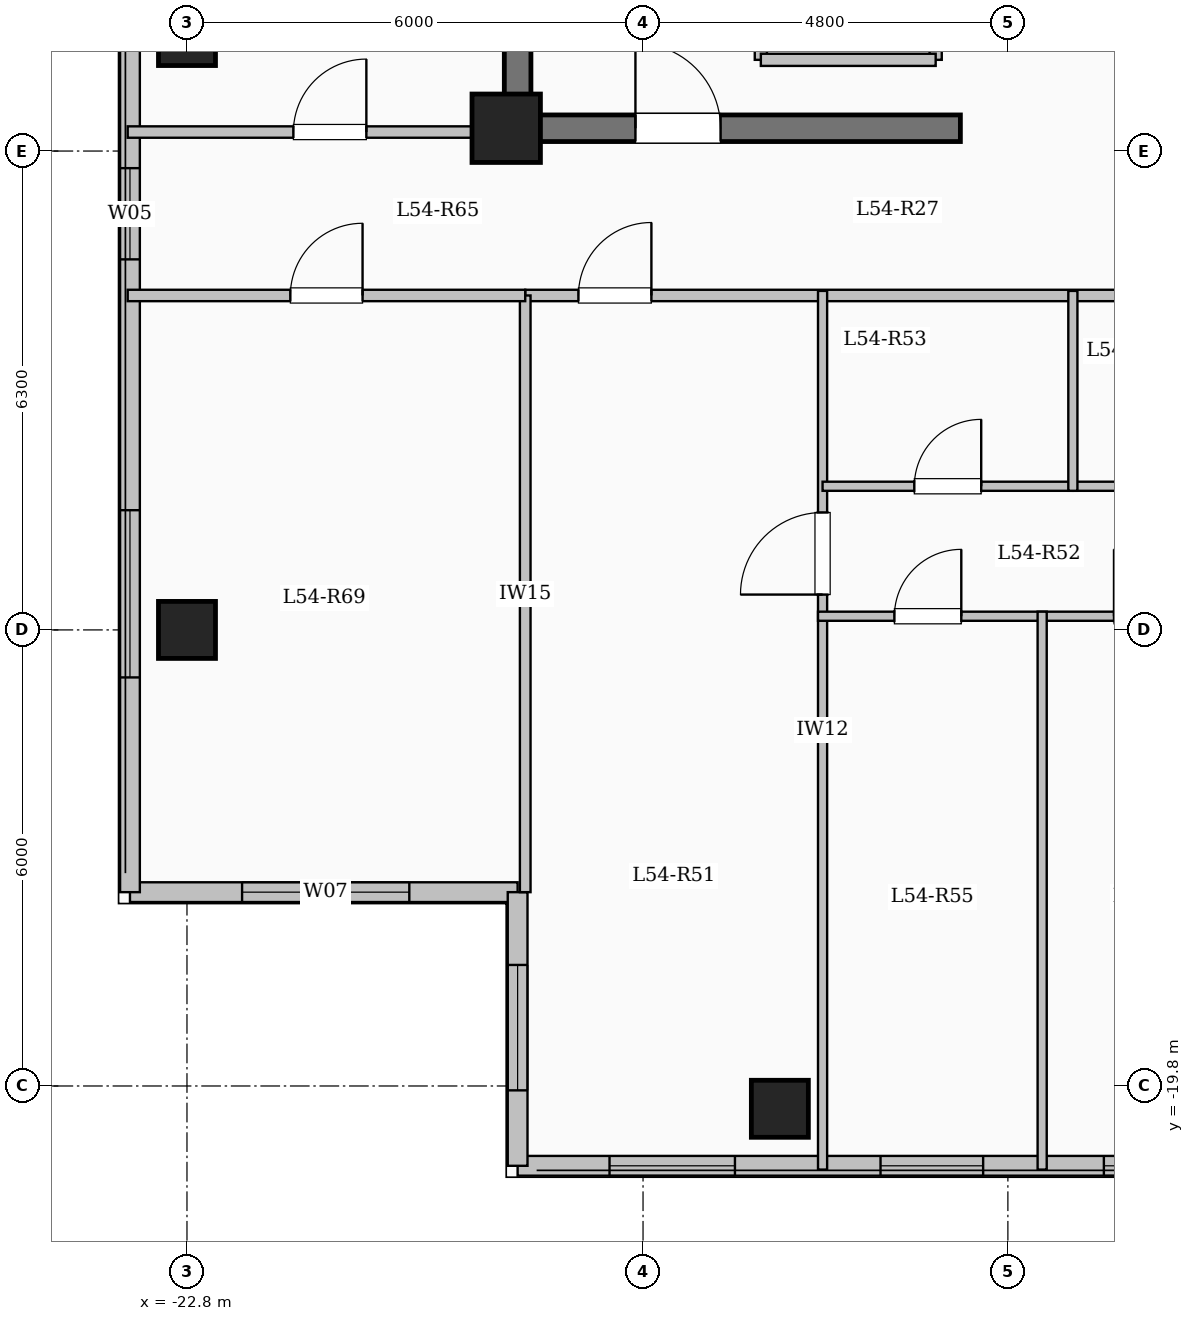
"""IFC4 building model, lengths in metres.
Left out: names, types, materials, properties, quantities, classifications, styles, units other than length and angle.
Written with IfcOpenShell. Run it as: python <this file> out.ifc"""

import sys

from ifc_helpers import new_model, si_unit, direction, frame, frame_2d, origin, origin_2d, place, context, subcontext, project, spatial, rectangle, extrude, element, fill, save


model = new_model("IFC4")
c1 = context("Model", 3, precision=1e-05, world=origin(), true_north=direction((0.0, 1.0)))
c2 = subcontext(c1, "Body", "Model", "MODEL_VIEW")
j1 = project(units=[si_unit("LENGTHUNIT", "METRE"), si_unit("PLANEANGLEUNIT", "RADIAN")], contexts=[c1])
p1 = place(None, origin())
s1 = spatial("IfcSite", under=j1, at=p1, CompositionType="ELEMENT")
p2 = place(p1, origin())
s2 = spatial("IfcBuilding", under=s1, at=p2, CompositionType="ELEMENT")
p3 = place(p2, frame((0.0, 0.0, 200.3)))
s3 = spatial("IfcBuildingStorey", under=s2, at=p3, CompositionType="ELEMENT", Elevation=200.3)
p4 = place(p3, frame((-18.6, -7.2, 0.0), z_axis=(0.0, 0.0, 1.0), x_axis=(1.0, 0.0, 0.0)))
e1 = element("IfcColumn", 1, at=p4, inside=s3, PredefinedType="COLUMN", context=c2, shape_type="SweptSolid", body=[
    extrude(rectangle(XDim=0.9, YDim=0.9, at=origin_2d()), origin(), (0.0, 0.0, 1.0), 3.35),
])
for number, where, z_axis, x_axis in (
    (2, (-15.0, -20.1, 0.0), (0.0, 0.0, 1.0), (1.0, 0.0, 0.0)),
    (3, (-22.8, -13.8, 0.0), (0.0, 0.0, 1.0), (1.0, 0.0, 0.0)),
    (4, (-22.8, -6.0, 0.0), (0.0, 0.0, 1.0), (1.0, 0.0, 0.0)),
):
    element("IfcColumn", number, at=place(p3, frame(where, z_axis=z_axis, x_axis=x_axis)), inside=s3, PredefinedType="COLUMN", context=c2, shape_type="SweptSolid", body=[
        extrude(rectangle(XDim=0.75, YDim=0.75, at=origin_2d()), origin(), (0.0, 0.0, 1.0), 3.35),
    ])
p5 = place(p3, frame((-18.45, -17.25, 0.0), z_axis=(0.0, 0.0, 1.0), x_axis=(-1.0, 0.0, 0.0)))
e5 = element("IfcWall", 5, at=p5, inside=s3, PredefinedType="SOLIDWALL", context=c2, shape_type="SweptSolid", body=[
    extrude(rectangle(XDim=5.1, YDim=0.26, at=frame_2d((2.55, 0.0))), origin(), (0.0, 0.0, 1.0), 3.1),
])
p6 = place(p5, frame((1.425, 0.0, 0.9)))
e6 = element("IfcOpeningElement", 6, at=p6, cuts=e5, PredefinedType="OPENING", context=c2, shape_type="SweptSolid", body=[
    extrude(rectangle(XDim=2.2, YDim=1.75, at=frame_2d((1.1, 0.875))), frame((0.0, 0.14, 0.0), z_axis=(0.0, -1.0, 0.0), x_axis=(1.0, 0.0, 0.0)), (0.0, 0.0, 1.0), 0.28),
])
p7 = place(p3, frame((-23.55, -17.25, 0.0), z_axis=(0.0, 0.0, 1.0), x_axis=(0.0, 1.0, 0.0)))
e7 = element("IfcWall", 7, at=p7, inside=s3, PredefinedType="SOLIDWALL", context=c2, shape_type="SweptSolid", body=[
    extrude(rectangle(XDim=34.5, YDim=0.26, at=frame_2d((17.25, 0.0))), origin(), (0.0, 0.0, 1.0), 3.1),
])
p8 = place(p7, frame((2.825, 0.0, 0.9)))
e8 = element("IfcOpeningElement", 8, at=p8, cuts=e7, PredefinedType="OPENING", context=c2, shape_type="SweptSolid", body=[
    extrude(rectangle(XDim=2.2, YDim=1.75, at=frame_2d((1.1, 0.875))), frame((0.0, 0.14, 0.0), z_axis=(0.0, -1.0, 0.0), x_axis=(1.0, 0.0, 0.0)), (0.0, 0.0, 1.0), 0.28),
])
p9 = place(p7, frame((8.325, 0.0, 0.95)))
e9 = element("IfcOpeningElement", 9, at=p9, cuts=e7, PredefinedType="OPENING", context=c2, shape_type="SweptSolid", body=[
    extrude(rectangle(XDim=1.2, YDim=1.5, at=frame_2d((0.6, 0.75))), frame((0.0, 0.14, 0.0), z_axis=(0.0, -1.0, 0.0), x_axis=(1.0, 0.0, 0.0)), (0.0, 0.0, 1.0), 0.28),
])
p10 = place(p7, frame((13.25, 0.0, 0.9)))
e10 = element("IfcOpeningElement", 10, at=p10, cuts=e7, PredefinedType="OPENING", context=c2, shape_type="SweptSolid", body=[
    extrude(rectangle(XDim=2.2, YDim=1.75, at=frame_2d((1.1, 0.875))), frame((0.0, 0.14, 0.0), z_axis=(0.0, -1.0, 0.0), x_axis=(1.0, 0.0, 0.0)), (0.0, 0.0, 1.0), 0.28),
])
p11 = place(p7, frame((19.65, 0.0, 0.9)))
e11 = element("IfcOpeningElement", 11, at=p11, cuts=e7, PredefinedType="OPENING", context=c2, shape_type="SweptSolid", body=[
    extrude(rectangle(XDim=1.65, YDim=1.6, at=frame_2d((0.825, 0.8))), frame((0.0, 0.14, 0.0), z_axis=(0.0, -1.0, 0.0), x_axis=(1.0, 0.0, 0.0)), (0.0, 0.0, 1.0), 0.28),
])
p12 = place(p7, frame((24.125, 0.0, 0.9)))
e12 = element("IfcOpeningElement", 12, at=p12, cuts=e7, PredefinedType="OPENING", context=c2, shape_type="SweptSolid", body=[
    extrude(rectangle(XDim=2.0, YDim=1.7, at=frame_2d((1.0, 0.85))), frame((0.0, 0.14, 0.0), z_axis=(0.0, -1.0, 0.0), x_axis=(1.0, 0.0, 0.0)), (0.0, 0.0, 1.0), 0.28),
])
p13 = place(p7, frame((28.375, 0.0, 0.95)))
e13 = element("IfcOpeningElement", 13, at=p13, cuts=e7, PredefinedType="OPENING", context=c2, shape_type="SweptSolid", body=[
    extrude(rectangle(XDim=1.0, YDim=1.5, at=frame_2d((0.5, 0.75))), frame((0.0, 0.14, 0.0), z_axis=(0.0, -1.0, 0.0), x_axis=(1.0, 0.0, 0.0)), (0.0, 0.0, 1.0), 0.28),
])
p14 = place(p7, frame((31.125, 0.0, 0.9)))
e14 = element("IfcOpeningElement", 14, at=p14, cuts=e7, PredefinedType="OPENING", context=c2, shape_type="SweptSolid", body=[
    extrude(rectangle(XDim=2.0, YDim=1.7, at=frame_2d((1.0, 0.85))), frame((0.0, 0.14, 0.0), z_axis=(0.0, -1.0, 0.0), x_axis=(1.0, 0.0, 0.0)), (0.0, 0.0, 1.0), 0.28),
])
p15 = place(p3, frame((-7.35, -20.85, 0.0), z_axis=(0.0, 0.0, 1.0), x_axis=(-1.0, 0.0, 0.0)))
e15 = element("IfcWall", 15, at=p15, inside=s3, PredefinedType="SOLIDWALL", context=c2, shape_type="SweptSolid", body=[
    extrude(rectangle(XDim=11.1, YDim=0.26, at=frame_2d((5.55, 0.0))), origin(), (0.0, 0.0, 1.0), 3.1),
])
p16 = place(p15, frame((2.037, 0.0, 0.95)))
e16 = element("IfcOpeningElement", 16, at=p16, cuts=e15, PredefinedType="OPENING", context=c2, shape_type="SweptSolid", body=[
    extrude(rectangle(XDim=1.35, YDim=1.55, at=frame_2d((0.675, 0.775))), frame((0.0, 0.14, 0.0), z_axis=(0.0, -1.0, 0.0), x_axis=(1.0, 0.0, 0.0)), (0.0, 0.0, 1.0), 0.28),
])
p17 = place(p15, frame((4.976, 0.0, 0.95)))
e17 = element("IfcOpeningElement", 17, at=p17, cuts=e15, PredefinedType="OPENING", context=c2, shape_type="SweptSolid", body=[
    extrude(rectangle(XDim=1.35, YDim=1.55, at=frame_2d((0.675, 0.775))), frame((0.0, 0.14, 0.0), z_axis=(0.0, -1.0, 0.0), x_axis=(1.0, 0.0, 0.0)), (0.0, 0.0, 1.0), 0.28),
])
p18 = place(p15, frame((8.241, 0.0, 0.9)))
e18 = element("IfcOpeningElement", 18, at=p18, cuts=e15, PredefinedType="OPENING", context=c2, shape_type="SweptSolid", body=[
    extrude(rectangle(XDim=1.65, YDim=1.6, at=frame_2d((0.825, 0.8))), frame((0.0, 0.14, 0.0), z_axis=(0.0, -1.0, 0.0), x_axis=(1.0, 0.0, 0.0)), (0.0, 0.0, 1.0), 0.28),
])
p19 = place(p3, frame((-18.45, -20.85, 0.0), z_axis=(0.0, 0.0, 1.0), x_axis=(0.0, 1.0, 0.0)))
e19 = element("IfcWall", 19, at=p19, inside=s3, PredefinedType="SOLIDWALL", context=c2, shape_type="SweptSolid", body=[
    extrude(rectangle(XDim=3.6, YDim=0.26, at=frame_2d((1.8, 0.0))), origin(), (0.0, 0.0, 1.0), 3.1),
])
p20 = place(p19, frame((0.992, 0.0, 0.9)))
e20 = element("IfcOpeningElement", 20, at=p20, cuts=e19, PredefinedType="OPENING", context=c2, shape_type="SweptSolid", body=[
    extrude(rectangle(XDim=1.65, YDim=1.6, at=frame_2d((0.825, 0.8))), frame((0.0, 0.14, 0.0), z_axis=(0.0, -1.0, 0.0), x_axis=(1.0, 0.0, 0.0)), (0.0, 0.0, 1.0), 0.28),
])
p21 = place(p3, frame((-15.25, -6.3, 0.0), z_axis=(0.0, 0.0, 1.0), x_axis=(0.0, 1.0, 0.0)))
e21 = element("IfcWall", 21, at=p21, inside=s3, PredefinedType="SOLIDWALL", context=c2, shape_type="SweptSolid", body=[
    extrude(rectangle(XDim=2.6, YDim=0.16, at=frame_2d((1.3, 0.0))), origin(), (0.0, 0.0, 1.0), 3.1),
])
p22 = place(p21, frame((0.75, 0.0, 0.0)))
e22 = element("IfcOpeningElement", 22, at=p22, cuts=e21, PredefinedType="OPENING", context=c2, shape_type="SweptSolid", body=[
    extrude(rectangle(XDim=1.1, YDim=2.15, at=frame_2d((0.55, 1.075))), frame((0.0, 0.09, 0.0), z_axis=(0.0, -1.0, 0.0), x_axis=(1.0, 0.0, 0.0)), (0.0, 0.0, 1.0), 0.18),
])
p23 = place(p3, frame((-12.95, -6.3, 0.0), z_axis=(0.0, 0.0, 1.0), x_axis=(0.0, 1.0, 0.0)))
e23 = element("IfcWall", 23, at=p23, inside=s3, PredefinedType="SOLIDWALL", context=c2, shape_type="SweptSolid", body=[
    extrude(rectangle(XDim=2.6, YDim=0.16, at=frame_2d((1.3, 0.0))), origin(), (0.0, 0.0, 1.0), 3.1),
])
p24 = place(p3, frame((-15.25, -6.3, 0.0), z_axis=(0.0, 0.0, 1.0), x_axis=(1.0, 0.0, 0.0)))
e24 = element("IfcWall", 24, at=p24, inside=s3, PredefinedType="SOLIDWALL", context=c2, shape_type="SweptSolid", body=[
    extrude(rectangle(XDim=2.3, YDim=0.16, at=frame_2d((1.15, 0.0))), origin(), (0.0, 0.0, 1.0), 3.1),
])
p25 = place(p3, frame((-18.45, -7.375, 0.0), z_axis=(0.0, 0.0, 1.0), x_axis=(0.0, 1.0, 0.0)))
e25 = element("IfcWall", 25, at=p25, inside=s3, PredefinedType="SHEAR", context=c2, shape_type="SweptSolid", body=[
    extrude(rectangle(XDim=14.05, YDim=0.35, at=frame_2d((7.025, 0.0))), origin(), (0.0, 0.0, 1.0), 3.35),
])
p26 = place(p3, frame((-18.625, -7.2, 0.0), z_axis=(0.0, 0.0, 1.0), x_axis=(1.0, 0.0, 0.0)))
e26 = element("IfcWall", 26, at=p26, inside=s3, PredefinedType="SHEAR", context=c2, shape_type="SweptSolid", body=[
    extrude(rectangle(XDim=6.0, YDim=0.35, at=frame_2d((3.0, 0.0))), origin(), (0.0, 0.0, 1.0), 3.35),
])
p27 = place(p26, frame((1.725, 0.0, 0.0)))
e27 = element("IfcOpeningElement", 27, at=p27, cuts=e26, PredefinedType="OPENING", context=c2, shape_type="SweptSolid", body=[
    extrude(rectangle(XDim=1.12, YDim=2.15, at=frame_2d((0.56, 1.075))), frame((0.0, 0.185, 0.0), z_axis=(0.0, -1.0, 0.0), x_axis=(1.0, 0.0, 0.0)), (0.0, 0.0, 1.0), 0.37),
])
p28 = place(p3, frame((-18.35, -9.4, 0.0), z_axis=(0.0, 0.0, 1.0), x_axis=(1.0, 0.0, 0.0)))
e28 = element("IfcWall", 28, at=p28, inside=s3, PredefinedType="PARTITIONING", context=c2, shape_type="SweptSolid", body=[
    extrude(rectangle(XDim=9.8, YDim=0.15, at=frame_2d((4.9, 0.0))), origin(), (0.0, 0.0, 1.0), 3.1),
])
p29 = place(p28, frame((0.7, 0.0, 0.0)))
e29 = element("IfcOpeningElement", 29, at=p29, cuts=e28, PredefinedType="OPENING", context=c2, shape_type="SweptSolid", body=[
    extrude(rectangle(XDim=0.96, YDim=2.15, at=frame_2d((0.48, 1.075))), frame((0.0, 0.085, 0.0), z_axis=(0.0, -1.0, 0.0), x_axis=(1.0, 0.0, 0.0)), (0.0, 0.0, 1.0), 0.17),
])
p30 = place(p3, frame((-14.438, -20.9, 0.0), z_axis=(0.0, 0.0, 1.0), x_axis=(0.0, 1.0, 0.0)))
e30 = element("IfcWall", 30, at=p30, inside=s3, PredefinedType="PARTITIONING", context=c2, shape_type="SweptSolid", body=[
    extrude(rectangle(XDim=11.56, YDim=0.12, at=frame_2d((5.78, 0.0))), origin(), (0.0, 0.0, 1.0), 3.1),
])
p31 = place(p30, frame((7.565, 0.0, 0.0)))
e31 = element("IfcOpeningElement", 31, at=p31, cuts=e30, PredefinedType="OPENING", context=c2, shape_type="SweptSolid", body=[
    extrude(rectangle(XDim=1.08, YDim=2.15, at=frame_2d((0.54, 1.075))), frame((0.0, 0.07, 0.0), z_axis=(0.0, -1.0, 0.0), x_axis=(1.0, 0.0, 0.0)), (0.0, 0.0, 1.0), 0.14),
])
p32 = place(p3, frame((-14.438, -11.91, 0.0), z_axis=(0.0, 0.0, 1.0), x_axis=(1.0, 0.0, 0.0)))
e32 = element("IfcWall", 32, at=p32, inside=s3, PredefinedType="PARTITIONING", context=c2, shape_type="SweptSolid", body=[
    extrude(rectangle(XDim=3.293, YDim=0.12, at=frame_2d((1.646, 0.0))), origin(), (0.0, 0.0, 1.0), 3.1),
])
p33 = place(p32, frame((1.207, 0.0, 0.0)))
e33 = element("IfcOpeningElement", 33, at=p33, cuts=e32, PredefinedType="OPENING", context=c2, shape_type="SweptSolid", body=[
    extrude(rectangle(XDim=0.88, YDim=2.1, at=frame_2d((0.44, 1.05))), frame((0.0, 0.07, 0.0), z_axis=(0.0, -1.0, 0.0), x_axis=(1.0, 0.0, 0.0)), (0.0, 0.0, 1.0), 0.14),
])
p34 = place(p3, frame((-11.145, -11.91, 0.0), z_axis=(0.0, 0.0, 1.0), x_axis=(1.0, 0.0, 0.0)))
e34 = element("IfcWall", 34, at=p34, inside=s3, PredefinedType="PARTITIONING", context=c2, shape_type="SweptSolid", body=[
    extrude(rectangle(XDim=2.545, YDim=0.12, at=frame_2d((1.272, 0.0))), origin(), (0.0, 0.0, 1.0), 3.1),
])
p35 = place(p34, frame((0.833, 0.0, 0.0)))
e35 = element("IfcOpeningElement", 35, at=p35, cuts=e34, PredefinedType="OPENING", context=c2, shape_type="SweptSolid", body=[
    extrude(rectangle(XDim=0.88, YDim=2.1, at=frame_2d((0.44, 1.05))), frame((0.0, 0.07, 0.0), z_axis=(0.0, -1.0, 0.0), x_axis=(1.0, 0.0, 0.0)), (0.0, 0.0, 1.0), 0.14),
])
p36 = place(p3, frame((-14.498, -13.62, 0.0), z_axis=(0.0, 0.0, 1.0), x_axis=(1.0, 0.0, 0.0)))
e36 = element("IfcWall", 36, at=p36, inside=s3, PredefinedType="PARTITIONING", context=c2, shape_type="SweptSolid", body=[
    extrude(rectangle(XDim=5.958, YDim=0.12, at=frame_2d((2.979, 0.0))), origin(), (0.0, 0.0, 1.0), 3.1),
])
p37 = place(p36, frame((1.005, 0.0, 0.0)))
e37 = element("IfcOpeningElement", 37, at=p37, cuts=e36, PredefinedType="OPENING", context=c2, shape_type="SweptSolid", body=[
    extrude(rectangle(XDim=0.88, YDim=2.1, at=frame_2d((0.44, 1.05))), frame((0.0, 0.07, 0.0), z_axis=(0.0, -1.0, 0.0), x_axis=(1.0, 0.0, 0.0)), (0.0, 0.0, 1.0), 0.14),
])
p38 = place(p36, frame((3.894, 0.0, 0.0)))
e38 = element("IfcOpeningElement", 38, at=p38, cuts=e36, PredefinedType="OPENING", context=c2, shape_type="SweptSolid", body=[
    extrude(rectangle(XDim=0.88, YDim=2.1, at=frame_2d((0.44, 1.05))), frame((0.0, 0.07, 0.0), z_axis=(0.0, -1.0, 0.0), x_axis=(1.0, 0.0, 0.0)), (0.0, 0.0, 1.0), 0.14),
])
p39 = place(p3, frame((-11.145, -11.97, 0.0), z_axis=(0.0, 0.0, 1.0), x_axis=(0.0, 1.0, 0.0)))
e39 = element("IfcWall", 39, at=p39, inside=s3, PredefinedType="PARTITIONING", context=c2, shape_type="SweptSolid", body=[
    extrude(rectangle(XDim=2.63, YDim=0.12, at=frame_2d((1.315, 0.0))), origin(), (0.0, 0.0, 1.0), 3.1),
])
p40 = place(p3, frame((-11.549, -20.9, 0.0), z_axis=(0.0, 0.0, 1.0), x_axis=(0.0, 1.0, 0.0)))
e40 = element("IfcWall", 40, at=p40, inside=s3, PredefinedType="PARTITIONING", context=c2, shape_type="SweptSolid", body=[
    extrude(rectangle(XDim=7.34, YDim=0.12, at=frame_2d((3.67, 0.0))), origin(), (0.0, 0.0, 1.0), 3.1),
])
p41 = place(p3, frame((-23.58, -7.25, 0.0), z_axis=(0.0, 0.0, 1.0), x_axis=(1.0, 0.0, 0.0)))
e41 = element("IfcWall", 41, at=p41, inside=s3, PredefinedType="PARTITIONING", context=c2, shape_type="SweptSolid", body=[
    extrude(rectangle(XDim=5.13, YDim=0.15, at=frame_2d((2.565, 0.0))), origin(), (0.0, 0.0, 1.0), 3.1),
])
p42 = place(p41, frame((2.18, 0.0, 0.0)))
e42 = element("IfcOpeningElement", 42, at=p42, cuts=e41, PredefinedType="OPENING", context=c2, shape_type="SweptSolid", body=[
    extrude(rectangle(XDim=0.96, YDim=2.15, at=frame_2d((0.48, 1.075))), frame((0.0, 0.085, 0.0), z_axis=(0.0, -1.0, 0.0), x_axis=(1.0, 0.0, 0.0)), (0.0, 0.0, 1.0), 0.17),
])
p43 = place(p3, frame((-18.35, -17.25, 0.0), z_axis=(0.0, 0.0, 1.0), x_axis=(0.0, 1.0, 0.0)))
e43 = element("IfcWall", 43, at=p43, inside=s3, PredefinedType="PARTITIONING", context=c2, shape_type="SweptSolid", body=[
    extrude(rectangle(XDim=7.85, YDim=0.14, at=frame_2d((3.925, 0.0))), origin(), (0.0, 0.0, 1.0), 3.1),
])
p44 = place(p3, frame((-23.58, -9.4, 0.0), z_axis=(0.0, 0.0, 1.0), x_axis=(1.0, 0.0, 0.0)))
e44 = element("IfcWall", 44, at=p44, inside=s3, PredefinedType="PARTITIONING", context=c2, shape_type="SweptSolid", body=[
    extrude(rectangle(XDim=5.23, YDim=0.15, at=frame_2d((2.615, 0.0))), origin(), (0.0, 0.0, 1.0), 3.1),
])
p45 = place(p44, frame((2.14, 0.0, 0.0)))
e45 = element("IfcOpeningElement", 45, at=p45, cuts=e44, PredefinedType="OPENING", context=c2, shape_type="SweptSolid", body=[
    extrude(rectangle(XDim=0.95, YDim=2.15, at=frame_2d((0.475, 1.075))), frame((0.0, 0.085, 0.0), z_axis=(0.0, -1.0, 0.0), x_axis=(1.0, 0.0, 0.0)), (0.0, 0.0, 1.0), 0.17),
])
p46 = place(p6, origin())
e46 = element("IfcWindow", 46, at=p46, inside=s3, PartitioningType="SINGLE_PANEL", PredefinedType="WINDOW", context=c2, shape_type="SweptSolid", body=[
    extrude(rectangle(XDim=2.2, YDim=1.75, at=frame_2d((1.1, 0.875))), frame((0.0, 0.03, 0.0), z_axis=(0.0, -1.0, 0.0), x_axis=(1.0, 0.0, 0.0)), (0.0, 0.0, 1.0), 0.06),
])
fill(e6, e46)
p47 = place(p8, origin())
e47 = element("IfcWindow", 47, at=p47, inside=s3, PartitioningType="SINGLE_PANEL", PredefinedType="WINDOW", context=c2, shape_type="SweptSolid", body=[
    extrude(rectangle(XDim=2.2, YDim=1.75, at=frame_2d((1.1, 0.875))), frame((0.0, 0.03, 0.0), z_axis=(0.0, -1.0, 0.0), x_axis=(1.0, 0.0, 0.0)), (0.0, 0.0, 1.0), 0.06),
])
fill(e8, e47)
p48 = place(p9, origin())
e48 = element("IfcWindow", 48, at=p48, inside=s3, PartitioningType="SINGLE_PANEL", PredefinedType="WINDOW", context=c2, shape_type="SweptSolid", body=[
    extrude(rectangle(XDim=1.2, YDim=1.5, at=frame_2d((0.6, 0.75))), frame((0.0, 0.03, 0.0), z_axis=(0.0, -1.0, 0.0), x_axis=(1.0, 0.0, 0.0)), (0.0, 0.0, 1.0), 0.06),
])
fill(e9, e48)
p49 = place(p16, origin())
e49 = element("IfcWindow", 49, at=p49, inside=s3, PartitioningType="SINGLE_PANEL", PredefinedType="WINDOW", context=c2, shape_type="SweptSolid", body=[
    extrude(rectangle(XDim=1.35, YDim=1.55, at=frame_2d((0.675, 0.775))), frame((0.0, 0.03, 0.0), z_axis=(0.0, -1.0, 0.0), x_axis=(1.0, 0.0, 0.0)), (0.0, 0.0, 1.0), 0.06),
])
fill(e16, e49)
p50 = place(p17, origin())
e50 = element("IfcWindow", 50, at=p50, inside=s3, PartitioningType="SINGLE_PANEL", PredefinedType="WINDOW", context=c2, shape_type="SweptSolid", body=[
    extrude(rectangle(XDim=1.35, YDim=1.55, at=frame_2d((0.675, 0.775))), frame((0.0, 0.03, 0.0), z_axis=(0.0, -1.0, 0.0), x_axis=(1.0, 0.0, 0.0)), (0.0, 0.0, 1.0), 0.06),
])
fill(e17, e50)
p51 = place(p18, origin())
e51 = element("IfcWindow", 51, at=p51, inside=s3, PartitioningType="SINGLE_PANEL", PredefinedType="WINDOW", context=c2, shape_type="SweptSolid", body=[
    extrude(rectangle(XDim=1.65, YDim=1.6, at=frame_2d((0.825, 0.8))), frame((0.0, 0.03, 0.0), z_axis=(0.0, -1.0, 0.0), x_axis=(1.0, 0.0, 0.0)), (0.0, 0.0, 1.0), 0.06),
])
fill(e18, e51)
p52 = place(p20, origin())
e52 = element("IfcWindow", 52, at=p52, inside=s3, PartitioningType="SINGLE_PANEL", PredefinedType="WINDOW", context=c2, shape_type="SweptSolid", body=[
    extrude(rectangle(XDim=1.65, YDim=1.6, at=frame_2d((0.825, 0.8))), frame((0.0, 0.03, 0.0), z_axis=(0.0, -1.0, 0.0), x_axis=(1.0, 0.0, 0.0)), (0.0, 0.0, 1.0), 0.06),
])
fill(e20, e52)
p53 = place(p27, origin())
e53 = element("IfcDoor", 53, at=p53, inside=s3, OperationType="SINGLE_SWING_LEFT", PredefinedType="DOOR", context=c2, shape_type="SweptSolid", body=[
    extrude(rectangle(XDim=1.12, YDim=2.15, at=frame_2d((0.56, 1.075))), frame((0.0, 0.025, 0.0), z_axis=(0.0, -1.0, 0.0), x_axis=(1.0, 0.0, 0.0)), (0.0, 0.0, 1.0), 0.05),
])
fill(e27, e53)
p54 = place(p29, origin())
e54 = element("IfcDoor", 54, at=p54, inside=s3, OperationType="SINGLE_SWING_RIGHT", PredefinedType="DOOR", context=c2, shape_type="SweptSolid", body=[
    extrude(rectangle(XDim=0.96, YDim=2.15, at=frame_2d((0.48, 1.075))), frame((0.0, 0.025, 0.0), z_axis=(0.0, -1.0, 0.0), x_axis=(1.0, 0.0, 0.0)), (0.0, 0.0, 1.0), 0.05),
])
fill(e29, e54)
p55 = place(p31, origin())
e55 = element("IfcDoor", 55, at=p55, inside=s3, OperationType="SINGLE_SWING_LEFT", PredefinedType="DOOR", context=c2, shape_type="SweptSolid", body=[
    extrude(rectangle(XDim=1.08, YDim=2.15, at=frame_2d((0.54, 1.075))), frame((0.0, 0.025, 0.0), z_axis=(0.0, -1.0, 0.0), x_axis=(1.0, 0.0, 0.0)), (0.0, 0.0, 1.0), 0.05),
])
fill(e31, e55)
p56 = place(p33, origin())
e56 = element("IfcDoor", 56, at=p56, inside=s3, OperationType="SINGLE_SWING_RIGHT", PredefinedType="DOOR", context=c2, shape_type="SweptSolid", body=[
    extrude(rectangle(XDim=0.88, YDim=2.1, at=frame_2d((0.44, 1.05))), frame((0.0, 0.025, 0.0), z_axis=(0.0, -1.0, 0.0), x_axis=(1.0, 0.0, 0.0)), (0.0, 0.0, 1.0), 0.05),
])
fill(e33, e56)
p57 = place(p37, origin())
e57 = element("IfcDoor", 57, at=p57, inside=s3, OperationType="SINGLE_SWING_RIGHT", PredefinedType="DOOR", context=c2, shape_type="SweptSolid", body=[
    extrude(rectangle(XDim=0.88, YDim=2.1, at=frame_2d((0.44, 1.05))), frame((0.0, 0.025, 0.0), z_axis=(0.0, -1.0, 0.0), x_axis=(1.0, 0.0, 0.0)), (0.0, 0.0, 1.0), 0.05),
])
fill(e37, e57)
p58 = place(p45, origin())
e58 = element("IfcDoor", 58, at=p58, inside=s3, OperationType="SINGLE_SWING_RIGHT", PredefinedType="DOOR", context=c2, shape_type="SweptSolid", body=[
    extrude(rectangle(XDim=0.95, YDim=2.15, at=frame_2d((0.475, 1.075))), frame((0.0, 0.025, 0.0), z_axis=(0.0, -1.0, 0.0), x_axis=(1.0, 0.0, 0.0)), (0.0, 0.0, 1.0), 0.05),
])
fill(e45, e58)
p59 = place(p42, origin())
e59 = element("IfcDoor", 59, at=p59, inside=s3, OperationType="SINGLE_SWING_RIGHT", PredefinedType="DOOR", context=c2, shape_type="SweptSolid", body=[
    extrude(rectangle(XDim=0.96, YDim=2.15, at=frame_2d((0.48, 1.075))), frame((0.0, 0.025, 0.0), z_axis=(0.0, -1.0, 0.0), x_axis=(1.0, 0.0, 0.0)), (0.0, 0.0, 1.0), 0.05),
])
fill(e42, e59)
save(model, sys.argv[1])
